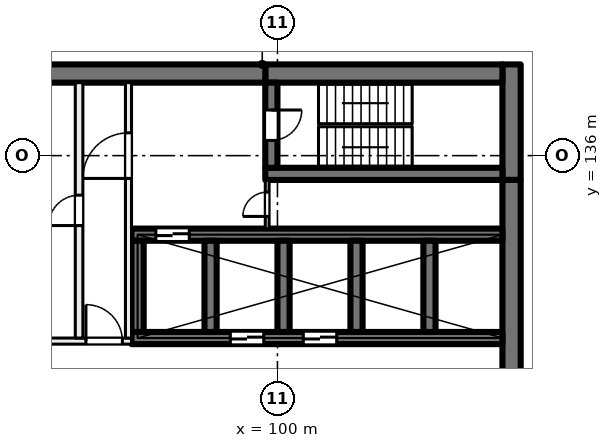
"""IFC4 building model, lengths in metres.
Left out: names, types, materials, properties, quantities, classifications, styles, units other than length and angle.
Written with IfcOpenShell. Run it as: python <this file> out.ifc"""

import sys

from ifc_helpers import new_model, si_unit, direction, frame, frame_2d, origin, place, context, subcontext, project, spatial, rectangle, extrude, element, fill, save


model = new_model("IFC4")
c1 = context("Model", 3, precision=1e-05, world=origin(), true_north=direction((0.0, 1.0)))
c2 = subcontext(c1, "Body", "Model", "MODEL_VIEW")
j1 = project(units=[si_unit("LENGTHUNIT", "METRE"), si_unit("PLANEANGLEUNIT", "RADIAN")], contexts=[c1])
p1 = place(None, origin())
s1 = spatial("IfcSite", under=j1, at=p1, CompositionType="ELEMENT")
p2 = place(p1, origin())
s2 = spatial("IfcBuilding", under=s1, at=p2, CompositionType="ELEMENT")
p3 = place(p2, frame((0.0, 0.0, 47.5)))
s3 = spatial("IfcBuildingStorey", under=s2, at=p3, CompositionType="ELEMENT", Elevation=47.5)
p4 = place(p3, frame((107.7, 139.0, 0.0), z_axis=(0.0, 0.0, 1.0), x_axis=(0.0, -1.0, 0.0)))
e1 = element("IfcWall", 1, at=p4, inside=s3, PredefinedType="SHEAR", context=c2, shape_type="SweptSolid", body=[
    extrude(rectangle(XDim=3.8, YDim=0.6, at=frame_2d((1.9, 0.0))), origin(), (0.0, 0.0, 1.0), 4.0),
])
p5 = place(p3, frame((107.7, 135.2, 0.0), z_axis=(0.0, 0.0, 1.0), x_axis=(0.0, -1.0, 0.0)))
e2 = element("IfcWall", 2, at=p5, inside=s3, PredefinedType="SHEAR", context=c2, shape_type="SweptSolid", body=[
    extrude(rectangle(XDim=14.4, YDim=0.6, at=frame_2d((7.2, 0.0))), origin(), (0.0, 0.0, 1.0), 4.0),
])
p6 = place(p3, frame((107.4, 138.7, 0.0), z_axis=(0.0, 0.0, 1.0), x_axis=(-1.0, 0.0, 0.0)))
e3 = element("IfcWall", 3, at=p6, inside=s3, PredefinedType="SHEAR", context=c2, shape_type="SweptSolid", body=[
    extrude(rectangle(XDim=7.8, YDim=0.6, at=frame_2d((3.9, 0.0))), origin(), (0.0, 0.0, 1.0), 4.0),
])
p7 = place(p3, frame((99.6, 138.7, 0.0), z_axis=(0.0, 0.0, 1.0), x_axis=(-1.0, 0.0, 0.0)))
e4 = element("IfcWall", 4, at=p7, inside=s3, PredefinedType="SHEAR", context=c2, shape_type="SweptSolid", body=[
    extrude(rectangle(XDim=8.9, YDim=0.6, at=frame_2d((4.45, 0.0))), origin(), (0.0, 0.0, 1.0), 4.0),
])
p8 = place(p3, frame((107.4, 135.4, 0.0), z_axis=(0.0, 0.0, 1.0), x_axis=(-1.0, 0.0, 0.0)))
e5 = element("IfcWall", 5, at=p8, inside=s3, PredefinedType="SHEAR", context=c2, shape_type="SweptSolid", body=[
    extrude(rectangle(XDim=7.8, YDim=0.4, at=frame_2d((3.9, 0.0))), origin(), (0.0, 0.0, 1.0), 4.0),
])
p9 = place(p3, frame((99.8, 138.4, 0.0), z_axis=(0.0, 0.0, 1.0), x_axis=(0.0, -1.0, 0.0)))
e6 = element("IfcWall", 6, at=p9, inside=s3, PredefinedType="SHEAR", context=c2, shape_type="SweptSolid", body=[
    extrude(rectangle(XDim=2.8, YDim=0.4, at=frame_2d((1.4, 0.0))), origin(), (0.0, 0.0, 1.0), 4.0),
])
p10 = place(p9, frame((0.9, 0.0, 0.0)))
e7 = element("IfcOpeningElement", 7, at=p10, cuts=e6, PredefinedType="OPENING", context=c2, shape_type="SweptSolid", body=[
    extrude(rectangle(XDim=1.0, YDim=2.1, at=frame_2d((0.5, 1.05))), frame((0.0, 0.21, 0.0), z_axis=(0.0, -1.0, 0.0), x_axis=(1.0, 0.0, 0.0)), (0.0, 0.0, 1.0), 0.42),
])
p11 = place(p3, frame((107.4, 130.0, 0.0), z_axis=(0.0, 0.0, 1.0), x_axis=(-1.0, 0.0, 0.0)))
e8 = element("IfcWall", 8, at=p11, inside=s3, PredefinedType="SHEAR", context=c2, shape_type="SweptSolid", body=[
    extrude(rectangle(XDim=12.2, YDim=0.4, at=frame_2d((6.1, 0.0))), origin(), (0.0, 0.0, 1.0), 4.0),
])
p12 = place(p11, frame((5.45, 0.0, 0.0)))
e9 = element("IfcOpeningElement", 9, at=p12, cuts=e8, PredefinedType="OPENING", context=c2, shape_type="SweptSolid", body=[
    extrude(rectangle(XDim=1.1, YDim=2.1, at=frame_2d((0.55, 1.05))), frame((0.0, 0.21, 0.0), z_axis=(0.0, -1.0, 0.0), x_axis=(1.0, 0.0, 0.0)), (0.0, 0.0, 1.0), 0.42),
])
p13 = place(p11, frame((7.85, 0.0, 0.0)))
e10 = element("IfcOpeningElement", 10, at=p13, cuts=e8, PredefinedType="OPENING", context=c2, shape_type="SweptSolid", body=[
    extrude(rectangle(XDim=1.1, YDim=2.1, at=frame_2d((0.55, 1.05))), frame((0.0, 0.21, 0.0), z_axis=(0.0, -1.0, 0.0), x_axis=(1.0, 0.0, 0.0)), (0.0, 0.0, 1.0), 0.42),
])
p14 = place(p3, frame((107.4, 133.4, 0.0), z_axis=(0.0, 0.0, 1.0), x_axis=(-1.0, 0.0, 0.0)))
e11 = element("IfcWall", 11, at=p14, inside=s3, PredefinedType="SHEAR", context=c2, shape_type="SweptSolid", body=[
    extrude(rectangle(XDim=12.2, YDim=0.4, at=frame_2d((6.1, 0.0))), origin(), (0.0, 0.0, 1.0), 4.0),
])
p15 = place(p14, frame((10.3, 0.0, 0.0)))
e12 = element("IfcOpeningElement", 12, at=p15, cuts=e11, PredefinedType="OPENING", context=c2, shape_type="SweptSolid", body=[
    extrude(rectangle(XDim=1.1, YDim=2.1, at=frame_2d((0.55, 1.05))), frame((0.0, 0.21, 0.0), z_axis=(0.0, -1.0, 0.0), x_axis=(1.0, 0.0, 0.0)), (0.0, 0.0, 1.0), 0.42),
])
for number, where, z_axis, x_axis in (
    (13, (105.0, 133.2, 0.0), (0.0, 0.0, 1.0), (0.0, -1.0, 0.0)),
    (14, (102.6, 133.2, 0.0), (0.0, 0.0, 1.0), (0.0, -1.0, 0.0)),
    (15, (100.2, 133.2, 0.0), (0.0, 0.0, 1.0), (0.0, -1.0, 0.0)),
    (16, (97.8, 133.2, 0.0), (0.0, 0.0, 1.0), (0.0, -1.0, 0.0)),
    (17, (95.4, 133.2, 0.0), (0.0, 0.0, 1.0), (0.0, -1.0, 0.0)),
):
    element("IfcWall", number, at=place(p3, frame(where, z_axis=z_axis, x_axis=x_axis)), inside=s3, PredefinedType="SHEAR", context=c2, shape_type="SweptSolid", body=[
        extrude(rectangle(XDim=3.0, YDim=0.4, at=frame_2d((1.5, 0.0))), origin(), (0.0, 0.0, 1.0), 4.0),
    ])
p16 = place(p3, frame((91.4, 129.9, 0.0), z_axis=(0.0, 0.0, 1.0), x_axis=(1.0, 0.0, 0.0)))
e18 = element("IfcWall", 18, at=p16, inside=s3, PredefinedType="PARTITIONING", context=c2, shape_type="SweptSolid", body=[
    extrude(rectangle(XDim=3.8, YDim=0.2, at=frame_2d((1.9, 0.0))), origin(), (0.0, 0.0, 1.0), 3.625),
])
p17 = place(p16, frame((2.3, 0.0, 0.0)))
e19 = element("IfcOpeningElement", 19, at=p17, cuts=e18, PredefinedType="OPENING", context=c2, shape_type="SweptSolid", body=[
    extrude(rectangle(XDim=1.2, YDim=2.1, at=frame_2d((0.6, 1.05))), frame((0.0, 0.11, 0.0), z_axis=(0.0, -1.0, 0.0), x_axis=(1.0, 0.0, 0.0)), (0.0, 0.0, 1.0), 0.22),
])
p18 = place(p3, frame((95.1, 130.0, 0.0), z_axis=(0.0, 0.0, 1.0), x_axis=(0.0, 1.0, 0.0)))
e20 = element("IfcWall", 20, at=p18, inside=s3, PredefinedType="PARTITIONING", context=c2, shape_type="SweptSolid", body=[
    extrude(rectangle(XDim=8.4, YDim=0.2, at=frame_2d((4.2, 0.0))), origin(), (0.0, 0.0, 1.0), 3.625),
])
p19 = place(p18, frame((5.25, 0.0, 0.0)))
e21 = element("IfcOpeningElement", 21, at=p19, cuts=e20, PredefinedType="OPENING", context=c2, shape_type="SweptSolid", body=[
    extrude(rectangle(XDim=1.5, YDim=2.1, at=frame_2d((0.75, 1.05))), frame((0.0, 0.11, 0.0), z_axis=(0.0, -1.0, 0.0), x_axis=(1.0, 0.0, 0.0)), (0.0, 0.0, 1.0), 0.22),
])
p20 = place(p3, frame((93.475, 130.0, 0.0), z_axis=(0.0, 0.0, 1.0), x_axis=(0.0, 1.0, 0.0)))
e22 = element("IfcWall", 22, at=p20, inside=s3, PredefinedType="PARTITIONING", context=c2, shape_type="SweptSolid", body=[
    extrude(rectangle(XDim=8.4, YDim=0.25, at=frame_2d((4.2, 0.0))), origin(), (0.0, 0.0, 1.0), 3.625),
])
p21 = place(p20, frame((3.7, 0.0, 0.0)))
e23 = element("IfcOpeningElement", 23, at=p21, cuts=e22, PredefinedType="OPENING", context=c2, shape_type="SweptSolid", body=[
    extrude(rectangle(XDim=1.0, YDim=2.1, at=frame_2d((0.5, 1.05))), frame((0.0, 0.135, 0.0), z_axis=(0.0, -1.0, 0.0), x_axis=(1.0, 0.0, 0.0)), (0.0, 0.0, 1.0), 0.27),
])
p22 = place(p3, frame((99.663, 133.6, 0.0), z_axis=(0.0, 0.0, 1.0), x_axis=(0.0, 1.0, 0.0)))
e24 = element("IfcWall", 24, at=p22, inside=s3, PredefinedType="PARTITIONING", context=c2, shape_type="SweptSolid", body=[
    extrude(rectangle(XDim=1.6, YDim=0.125, at=frame_2d((0.8, 0.0))), origin(), (0.0, 0.0, 1.0), 3.625),
])
p23 = place(p22, frame((0.4, 0.0, 0.0)))
e25 = element("IfcOpeningElement", 25, at=p23, cuts=e24, PredefinedType="OPENING", context=c2, shape_type="SweptSolid", body=[
    extrude(rectangle(XDim=0.8, YDim=2.1, at=frame_2d((0.4, 1.05))), frame((0.0, 0.073, 0.0), z_axis=(0.0, -1.0, 0.0), x_axis=(1.0, 0.0, 0.0)), (0.0, 0.0, 1.0), 0.145),
])
p24 = place(p12, origin())
e26 = element("IfcDoor", 26, at=p24, inside=s3, OperationType="DOUBLE_DOOR_SLIDING", PredefinedType="DOOR", context=c2, shape_type="SweptSolid", body=[
    extrude(rectangle(XDim=1.1, YDim=2.1, at=frame_2d((0.55, 1.05))), frame((0.0, 0.025, 0.0), z_axis=(0.0, -1.0, 0.0), x_axis=(1.0, 0.0, 0.0)), (0.0, 0.0, 1.0), 0.05),
])
fill(e9, e26)
p25 = place(p13, origin())
e27 = element("IfcDoor", 27, at=p25, inside=s3, OperationType="DOUBLE_DOOR_SLIDING", PredefinedType="DOOR", context=c2, shape_type="SweptSolid", body=[
    extrude(rectangle(XDim=1.1, YDim=2.1, at=frame_2d((0.55, 1.05))), frame((0.0, 0.025, 0.0), z_axis=(0.0, -1.0, 0.0), x_axis=(1.0, 0.0, 0.0)), (0.0, 0.0, 1.0), 0.05),
])
fill(e10, e27)
p26 = place(p17, origin())
e28 = element("IfcDoor", 28, at=p26, inside=s3, OperationType="DOUBLE_DOOR_SINGLE_SWING", PredefinedType="DOOR", context=c2, shape_type="SweptSolid", body=[
    extrude(rectangle(XDim=1.2, YDim=2.1, at=frame_2d((0.6, 1.05))), frame((0.0, 0.025, 0.0), z_axis=(0.0, -1.0, 0.0), x_axis=(1.0, 0.0, 0.0)), (0.0, 0.0, 1.0), 0.05),
])
fill(e19, e28)
p27 = place(p19, origin())
e29 = element("IfcDoor", 29, at=p27, inside=s3, OperationType="DOUBLE_DOOR_SINGLE_SWING", PredefinedType="DOOR", context=c2, shape_type="SweptSolid", body=[
    extrude(rectangle(XDim=1.5, YDim=2.1, at=frame_2d((0.75, 1.05))), frame((0.0, 0.025, 0.0), z_axis=(0.0, -1.0, 0.0), x_axis=(1.0, 0.0, 0.0)), (0.0, 0.0, 1.0), 0.05),
])
fill(e21, e29)
p28 = place(p10, origin())
e30 = element("IfcDoor", 30, at=p28, inside=s3, OperationType="SINGLE_SWING_RIGHT", PredefinedType="DOOR", context=c2, shape_type="SweptSolid", body=[
    extrude(rectangle(XDim=1.0, YDim=2.1, at=frame_2d((0.5, 1.05))), frame((0.0, 0.025, 0.0), z_axis=(0.0, -1.0, 0.0), x_axis=(1.0, 0.0, 0.0)), (0.0, 0.0, 1.0), 0.05),
])
fill(e7, e30)
p29 = place(p23, origin())
e31 = element("IfcDoor", 31, at=p29, inside=s3, OperationType="SINGLE_SWING_LEFT", PredefinedType="DOOR", context=c2, shape_type="SweptSolid", body=[
    extrude(rectangle(XDim=0.8, YDim=2.1, at=frame_2d((0.4, 1.05))), frame((0.0, 0.025, 0.0), z_axis=(0.0, -1.0, 0.0), x_axis=(1.0, 0.0, 0.0)), (0.0, 0.0, 1.0), 0.05),
])
fill(e25, e31)
p30 = place(p21, origin())
e32 = element("IfcDoor", 32, at=p30, inside=s3, OperationType="SINGLE_SWING_RIGHT", PredefinedType="DOOR", context=c2, shape_type="SweptSolid", body=[
    extrude(rectangle(XDim=1.0, YDim=2.1, at=frame_2d((0.5, 1.05))), frame((0.0, 0.025, 0.0), z_axis=(0.0, -1.0, 0.0), x_axis=(1.0, 0.0, 0.0)), (0.0, 0.0, 1.0), 0.05),
])
fill(e23, e32)
p31 = place(p15, origin())
e33 = element("IfcDoor", 33, at=p31, inside=s3, OperationType="DOUBLE_DOOR_SLIDING", PredefinedType="DOOR", context=c2, shape_type="SweptSolid", body=[
    extrude(rectangle(XDim=1.1, YDim=2.1, at=frame_2d((0.55, 1.05))), frame((0.0, 0.025, 0.0), z_axis=(0.0, -1.0, 0.0), x_axis=(1.0, 0.0, 0.0)), (0.0, 0.0, 1.0), 0.05),
])
fill(e12, e33)
save(model, sys.argv[1])
